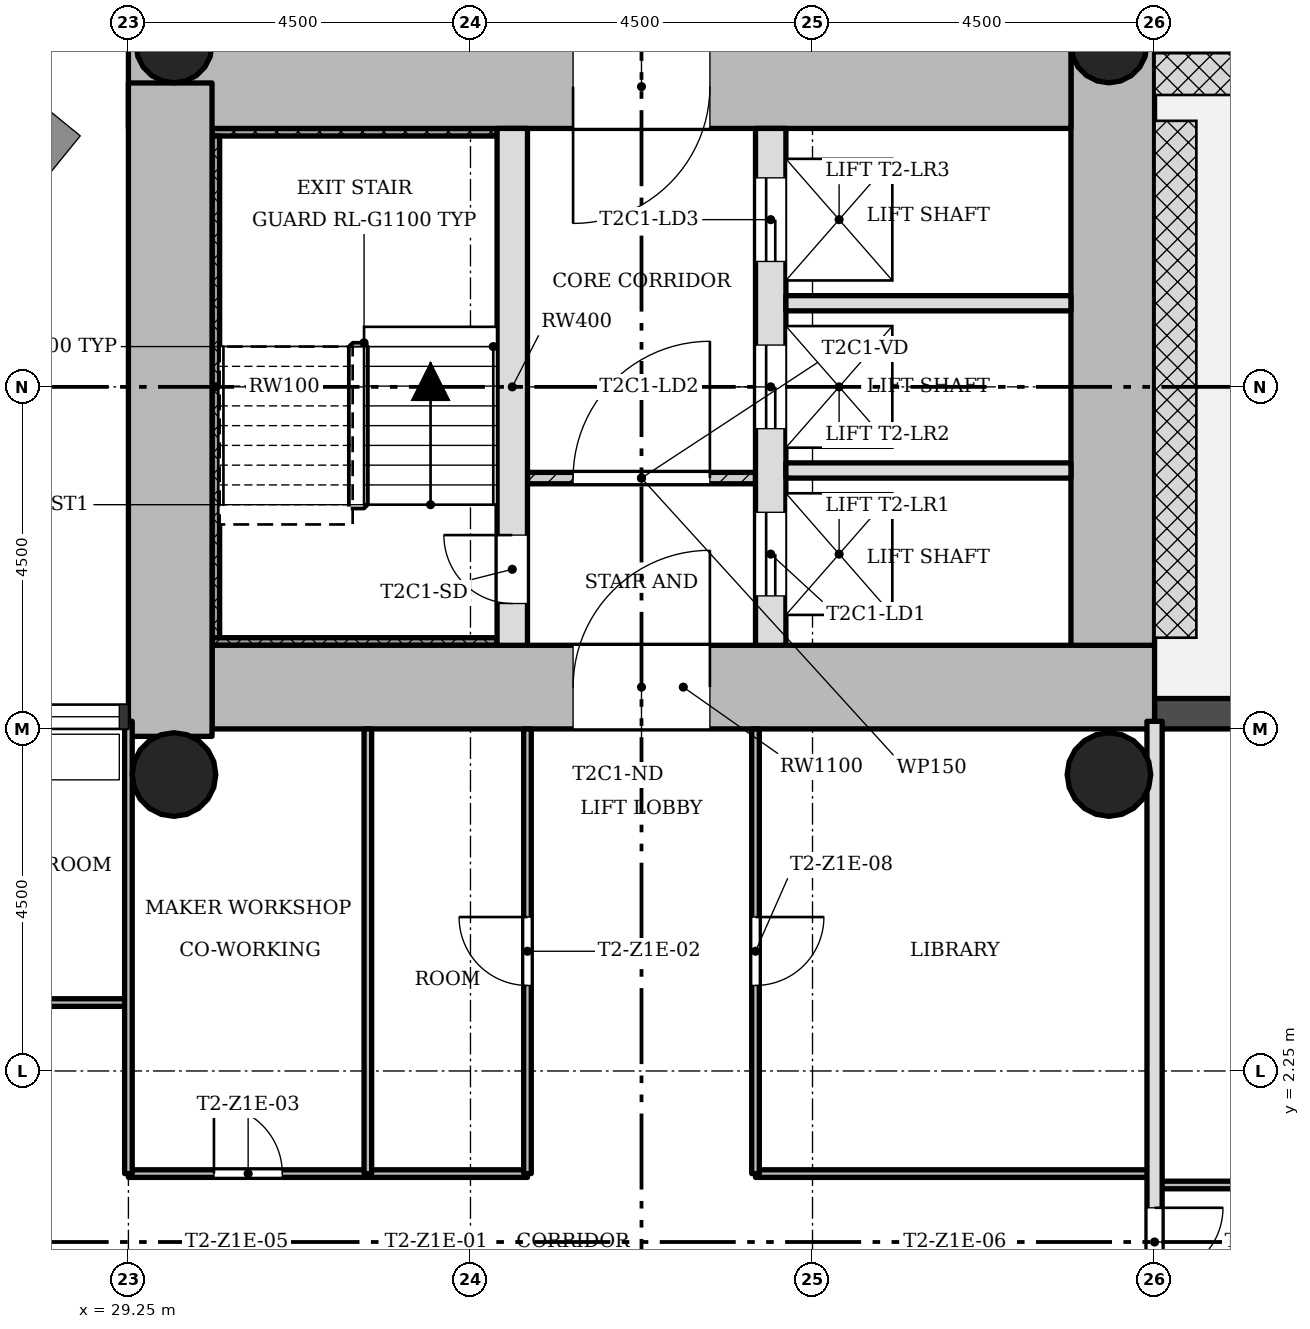
"""IFC4 building model, lengths in metres.
Left out: names, types, materials, properties, quantities, classifications, styles, units other than length and angle.
Written with IfcOpenShell. Run it as: python <this file> out.ifc"""

import sys

from ifc_helpers import new_model, si_unit, direction, frame, frame_2d, origin, origin_2d, place, context, subcontext, project, spatial, rectangle, hollow_circle, extrude, element, fill, save


model = new_model("IFC4")
c1 = context("Model", 3, precision=1e-05, world=origin(), true_north=direction((0.0, 1.0)))
c2 = subcontext(c1, "Body", "Model", "MODEL_VIEW")
j1 = project(units=[si_unit("LENGTHUNIT", "METRE"), si_unit("PLANEANGLEUNIT", "RADIAN")], contexts=[c1])
p1 = place(None, origin())
s1 = spatial("IfcSite", under=j1, at=p1, CompositionType="ELEMENT")
p2 = place(p1, origin())
s2 = spatial("IfcBuilding", under=s1, at=p2, CompositionType="ELEMENT")
p3 = place(p2, frame((0.0, 0.0, 65.3)))
s3 = spatial("IfcBuildingStorey", under=s2, at=p3, CompositionType="ELEMENT", Elevation=65.3)
p4 = place(p3, frame((30.35, 7.3, 0.0), z_axis=(0.0, 0.0, 1.0), x_axis=(1.0, 0.0, 0.0)))
e1 = element("IfcWall", 1, at=p4, inside=s3, PredefinedType="SHEAR", context=c2, shape_type="SweptSolid", body=[
    extrude(rectangle(XDim=12.4, YDim=1.1, at=frame_2d((6.2, 0.0))), origin(), (0.0, 0.0, 1.0), 3.4),
])
p5 = place(p4, frame((4.75, 0.0, 0.0)))
e2 = element("IfcOpeningElement", 2, at=p5, cuts=e1, PredefinedType="OPENING", context=c2, shape_type="SweptSolid", body=[
    extrude(rectangle(XDim=1.8, YDim=2.1, at=frame_2d((0.9, 1.05))), frame((0.0, 0.56, 0.0), z_axis=(0.0, -1.0, 0.0), x_axis=(1.0, 0.0, 0.0)), (0.0, 0.0, 1.0), 1.12),
])
p6 = place(p3, frame((42.2, 7.85, 0.0), z_axis=(0.0, 0.0, 1.0), x_axis=(0.0, 1.0, 0.0)))
e3 = element("IfcWall", 3, at=p6, inside=s3, PredefinedType="SHEAR", context=c2, shape_type="SweptSolid", body=[
    extrude(rectangle(XDim=7.9, YDim=1.1, at=frame_2d((3.95, 0.0))), origin(), (0.0, 0.0, 1.0), 3.4),
])
p7 = place(p3, frame((41.65, 15.2, 0.0), z_axis=(0.0, 0.0, 1.0), x_axis=(-1.0, 0.0, 0.0)))
e4 = element("IfcWall", 4, at=p7, inside=s3, PredefinedType="SHEAR", context=c2, shape_type="SweptSolid", body=[
    extrude(rectangle(XDim=12.4, YDim=1.1, at=frame_2d((6.2, 0.0))), origin(), (0.0, 0.0, 1.0), 3.4),
])
p8 = place(p7, frame((4.75, 0.0, 0.0)))
e5 = element("IfcOpeningElement", 5, at=p8, cuts=e4, PredefinedType="OPENING", context=c2, shape_type="SweptSolid", body=[
    extrude(rectangle(XDim=1.8, YDim=2.1, at=frame_2d((0.9, 1.05))), frame((0.0, 0.56, 0.0), z_axis=(0.0, -1.0, 0.0), x_axis=(1.0, 0.0, 0.0)), (0.0, 0.0, 1.0), 1.12),
])
p9 = place(p3, frame((29.8, 15.248, 0.0), z_axis=(0.0, 0.0, 1.0), x_axis=(0.0, -1.0, 0.0)))
e6 = element("IfcWall", 6, at=p9, inside=s3, PredefinedType="SHEAR", context=c2, shape_type="SweptSolid", body=[
    extrude(rectangle(XDim=8.596, YDim=1.1, at=frame_2d((4.298, 0.0))), origin(), (0.0, 0.0, 1.0), 3.4),
])
p10 = place(p3, frame((34.3, 7.85, 0.0), z_axis=(0.0, 0.0, 1.0), x_axis=(0.0, 1.0, 0.0)))
e7 = element("IfcWall", 7, at=p10, inside=s3, PredefinedType="SHEAR", context=c2, shape_type="SweptSolid", body=[
    extrude(rectangle(XDim=6.8, YDim=0.4, at=frame_2d((3.4, 0.0))), origin(), (0.0, 0.0, 1.0), 3.4),
])
p11 = place(p10, frame((0.55, 0.0, 0.0)))
e8 = element("IfcOpeningElement", 8, at=p11, cuts=e7, PredefinedType="OPENING", context=c2, shape_type="SweptSolid", body=[
    extrude(rectangle(XDim=0.9, YDim=2.1, at=frame_2d((0.45, 1.05))), frame((0.0, 0.21, 0.0), z_axis=(0.0, -1.0, 0.0), x_axis=(1.0, 0.0, 0.0)), (0.0, 0.0, 1.0), 0.42),
])
p12 = place(p3, frame((37.7, 7.85, 0.0), z_axis=(0.0, 0.0, 1.0), x_axis=(0.0, 1.0, 0.0)))
e9 = element("IfcWall", 9, at=p12, inside=s3, PredefinedType="SHEAR", context=c2, shape_type="SweptSolid", body=[
    extrude(rectangle(XDim=6.8, YDim=0.4, at=frame_2d((3.4, 0.0))), origin(), (0.0, 0.0, 1.0), 3.4),
])
p13 = place(p12, frame((0.65, 0.0, 0.0)))
e10 = element("IfcOpeningElement", 10, at=p13, cuts=e9, PredefinedType="OPENING", context=c2, shape_type="SweptSolid", body=[
    extrude(rectangle(XDim=1.1, YDim=2.1, at=frame_2d((0.55, 1.05))), frame((0.0, 0.21, 0.0), z_axis=(0.0, -1.0, 0.0), x_axis=(1.0, 0.0, 0.0)), (0.0, 0.0, 1.0), 0.42),
])
p14 = place(p12, frame((2.85, 0.0, 0.0)))
e11 = element("IfcOpeningElement", 11, at=p14, cuts=e9, PredefinedType="OPENING", context=c2, shape_type="SweptSolid", body=[
    extrude(rectangle(XDim=1.1, YDim=2.1, at=frame_2d((0.55, 1.05))), frame((0.0, 0.21, 0.0), z_axis=(0.0, -1.0, 0.0), x_axis=(1.0, 0.0, 0.0)), (0.0, 0.0, 1.0), 0.42),
])
p15 = place(p12, frame((5.05, 0.0, 0.0)))
e12 = element("IfcOpeningElement", 12, at=p15, cuts=e9, PredefinedType="OPENING", context=c2, shape_type="SweptSolid", body=[
    extrude(rectangle(XDim=1.1, YDim=2.1, at=frame_2d((0.55, 1.05))), frame((0.0, 0.21, 0.0), z_axis=(0.0, -1.0, 0.0), x_axis=(1.0, 0.0, 0.0)), (0.0, 0.0, 1.0), 0.42),
])
for number, where, z_axis, x_axis in (
    (13, (42.15, 15.75, 0.0), (0.0, 0.0, 1.0), (1.0, 0.0, 0.0)),
    (14, (29.85, 15.75, 0.0), (0.0, 0.0, 1.0), (1.0, 0.0, 0.0)),
):
    element("IfcColumn", number, at=place(p3, frame(where, z_axis=z_axis, x_axis=x_axis)), inside=s3, PredefinedType="COLUMN", context=c2, shape_type="SweptSolid", body=[
        extrude(hollow_circle(Radius=0.5, WallThickness=0.036, at=origin_2d()), origin(), (0.0, 0.0, 1.0), 3.4),
    ])
for number, where, z_axis, x_axis in (
    (15, (42.15, 6.15, 0.0), (0.0, 0.0, 1.0), (1.0, 0.0, 0.0)),
    (16, (29.85, 6.15, 0.0), (0.0, 0.0, 1.0), (1.0, 0.0, 0.0)),
):
    element("IfcColumn", number, at=place(p3, frame(where, z_axis=z_axis, x_axis=x_axis)), inside=s3, PredefinedType="COLUMN", context=c2, shape_type="SweptSolid", body=[
        extrude(hollow_circle(Radius=0.55, WallThickness=0.04, at=origin_2d()), origin(), (0.0, 0.0, 1.0), 3.4),
    ])
p16 = place(p3, frame((47.25, 6.95, -0.02), z_axis=(0.0, 0.0, 1.0), x_axis=(-1.0, 0.0, 0.0)))
e17 = element("IfcWall", 17, at=p16, inside=s3, PredefinedType="STANDARD", context=c2, shape_type="SweptSolid", body=[
    extrude(rectangle(XDim=4.5, YDim=0.4, at=frame_2d((2.25, 0.0))), origin(), (0.0, 0.0, 1.0), 3.12),
])
p17 = place(p16, frame((1.35, 0.0, 0.02)))
e18 = element("IfcOpeningElement", 18, at=p17, cuts=e17, PredefinedType="OPENING", context=c2, shape_type="SweptSolid", body=[
    extrude(rectangle(XDim=1.8, YDim=2.1, at=frame_2d((0.9, 1.05))), frame((0.0, 0.21, 0.0), z_axis=(0.0, -1.0, 0.0), x_axis=(1.0, 0.0, 0.0)), (0.0, 0.0, 1.0), 0.42),
])
p18 = place(p3, frame((37.5, 10.05, 0.0), z_axis=(0.0, 0.0, 1.0), x_axis=(-1.0, 0.0, 0.0)))
e19 = element("IfcWall", 19, at=p18, inside=s3, PredefinedType="PARTITIONING", context=c2, shape_type="SweptSolid", body=[
    extrude(rectangle(XDim=3.0, YDim=0.15, at=frame_2d((1.5, 0.0))), origin(), (0.0, 0.0, 1.0), 3.0),
])
p19 = place(p18, frame((0.6, 0.0, 0.0)))
e20 = element("IfcOpeningElement", 20, at=p19, cuts=e19, PredefinedType="OPENING", context=c2, shape_type="SweptSolid", body=[
    extrude(rectangle(XDim=1.8, YDim=2.1, at=frame_2d((0.9, 1.05))), frame((0.0, 0.085, 0.0), z_axis=(0.0, -1.0, 0.0), x_axis=(1.0, 0.0, 0.0)), (0.0, 0.0, 1.0), 0.17),
])
for number, where, z_axis, x_axis in (
    (21, (41.65, 10.15, 0.0), (0.0, 0.0, 1.0), (-1.0, 0.0, 0.0)),
    (22, (41.65, 12.35, 0.0), (0.0, 0.0, 1.0), (-1.0, 0.0, 0.0)),
):
    element("IfcWall", number, at=place(p3, frame(where, z_axis=z_axis, x_axis=x_axis)), inside=s3, PredefinedType="SOLIDWALL", context=c2, shape_type="SweptSolid", body=[
        extrude(rectangle(XDim=3.75, YDim=0.2, at=frame_2d((1.875, 0.0))), origin(), (0.0, 0.0, 1.0), 3.0),
    ])
p20 = place(p3, frame((47.25, 0.75, 0.0), z_axis=(0.0, 0.0, 1.0), x_axis=(-1.0, 0.0, 0.0)))
e23 = element("IfcWall", 23, at=p20, inside=s3, PredefinedType="PARTITIONING", context=c2, shape_type="SweptSolid", body=[
    extrude(rectangle(XDim=4.5, YDim=0.1, at=frame_2d((2.25, 0.0))), origin(), (0.0, 0.0, 1.0), 3.0),
])
p21 = place(p20, frame((1.8, 0.0, 0.0)))
e24 = element("IfcOpeningElement", 24, at=p21, cuts=e23, PredefinedType="OPENING", context=c2, shape_type="SweptSolid", body=[
    extrude(rectangle(XDim=0.9, YDim=2.1, at=frame_2d((0.45, 1.05))), frame((0.0, 0.06, 0.0), z_axis=(0.0, -1.0, 0.0), x_axis=(1.0, 0.0, 0.0)), (0.0, 0.0, 1.0), 0.12),
])
p22 = place(p3, frame((42.75, 0.9, 0.0), z_axis=(0.0, 0.0, 1.0), x_axis=(-1.0, 0.0, 0.0)))
e25 = element("IfcWall", 25, at=p22, inside=s3, PredefinedType="PARTITIONING", context=c2, shape_type="SweptSolid", body=[
    extrude(rectangle(XDim=5.25, YDim=0.1, at=frame_2d((2.625, 0.0))), origin(), (0.0, 0.0, 1.0), 3.0),
])
p23 = place(p3, frame((34.5, 0.9, 0.0), z_axis=(0.0, 0.0, 1.0), x_axis=(-1.0, 0.0, 0.0)))
e26 = element("IfcWall", 26, at=p23, inside=s3, PredefinedType="PARTITIONING", context=c2, shape_type="SweptSolid", body=[
    extrude(rectangle(XDim=5.25, YDim=0.1, at=frame_2d((2.625, 0.0))), origin(), (0.0, 0.0, 1.0), 3.0),
])
p24 = place(p23, frame((3.225, 0.0, 0.0)))
e27 = element("IfcOpeningElement", 27, at=p24, cuts=e26, PredefinedType="OPENING", context=c2, shape_type="SweptSolid", body=[
    extrude(rectangle(XDim=0.9, YDim=2.1, at=frame_2d((0.45, 1.05))), frame((0.0, 0.06, 0.0), z_axis=(0.0, -1.0, 0.0), x_axis=(1.0, 0.0, 0.0)), (0.0, 0.0, 1.0), 0.12),
])
p25 = place(p3, frame((29.25, 3.15, 0.0), z_axis=(0.0, 0.0, 1.0), x_axis=(-1.0, 0.0, 0.0)))
e28 = element("IfcWall", 28, at=p25, inside=s3, PredefinedType="PARTITIONING", context=c2, shape_type="SweptSolid", body=[
    extrude(rectangle(XDim=9.0, YDim=0.1, at=frame_2d((4.5, 0.0))), origin(), (0.0, 0.0, 1.0), 3.0),
])
p26 = place(p25, frame((1.8, 0.0, 0.0)))
e29 = element("IfcOpeningElement", 29, at=p26, cuts=e28, PredefinedType="OPENING", context=c2, shape_type="SweptSolid", body=[
    extrude(rectangle(XDim=0.9, YDim=2.1, at=frame_2d((0.45, 1.05))), frame((0.0, 0.06, 0.0), z_axis=(0.0, -1.0, 0.0), x_axis=(1.0, 0.0, 0.0)), (0.0, 0.0, 1.0), 0.12),
])
p27 = place(p25, frame((6.3, 0.0, 0.0)))
e30 = element("IfcOpeningElement", 30, at=p27, cuts=e28, PredefinedType="OPENING", context=c2, shape_type="SweptSolid", body=[
    extrude(rectangle(XDim=0.9, YDim=2.1, at=frame_2d((0.45, 1.05))), frame((0.0, 0.06, 0.0), z_axis=(0.0, -1.0, 0.0), x_axis=(1.0, 0.0, 0.0)), (0.0, 0.0, 1.0), 0.12),
])
p28 = place(p3, frame((42.75, -6.85, 0.0), z_axis=(0.0, 0.0, 1.0), x_axis=(0.0, 1.0, 0.0)))
e31 = element("IfcWall", 31, at=p28, inside=s3, PredefinedType="SOLIDWALL", context=c2, shape_type="SweptSolid", body=[
    extrude(rectangle(XDim=13.7, YDim=0.2, at=frame_2d((6.85, 0.0))), origin(), (0.0, 0.0, 1.0), 3.0),
])
p29 = place(p28, frame((6.4, 0.0, 0.0)))
e32 = element("IfcOpeningElement", 32, at=p29, cuts=e31, PredefinedType="OPENING", context=c2, shape_type="SweptSolid", body=[
    extrude(rectangle(XDim=0.9, YDim=2.1, at=frame_2d((0.45, 1.05))), frame((0.0, 0.11, 0.0), z_axis=(0.0, -1.0, 0.0), x_axis=(1.0, 0.0, 0.0)), (0.0, 0.0, 1.0), 0.22),
])
p30 = place(p3, frame((37.5, 0.9, 0.0), z_axis=(0.0, 0.0, 1.0), x_axis=(0.0, 1.0, 0.0)))
e33 = element("IfcWall", 33, at=p30, inside=s3, PredefinedType="PARTITIONING", context=c2, shape_type="SweptSolid", body=[
    extrude(rectangle(XDim=5.85, YDim=0.1, at=frame_2d((2.925, 0.0))), origin(), (0.0, 0.0, 1.0), 3.0),
])
p31 = place(p30, frame((2.475, 0.0, 0.0)))
e34 = element("IfcOpeningElement", 34, at=p31, cuts=e33, PredefinedType="OPENING", context=c2, shape_type="SweptSolid", body=[
    extrude(rectangle(XDim=0.9, YDim=2.1, at=frame_2d((0.45, 1.05))), frame((0.0, 0.06, 0.0), z_axis=(0.0, -1.0, 0.0), x_axis=(1.0, 0.0, 0.0)), (0.0, 0.0, 1.0), 0.12),
])
p32 = place(p3, frame((34.5, 0.9, 0.0), z_axis=(0.0, 0.0, 1.0), x_axis=(0.0, 1.0, 0.0)))
e35 = element("IfcWall", 35, at=p32, inside=s3, PredefinedType="PARTITIONING", context=c2, shape_type="SweptSolid", body=[
    extrude(rectangle(XDim=5.85, YDim=0.1, at=frame_2d((2.925, 0.0))), origin(), (0.0, 0.0, 1.0), 3.0),
])
p33 = place(p32, frame((2.475, 0.0, 0.0)))
e36 = element("IfcOpeningElement", 36, at=p33, cuts=e35, PredefinedType="OPENING", context=c2, shape_type="SweptSolid", body=[
    extrude(rectangle(XDim=0.9, YDim=2.1, at=frame_2d((0.45, 1.05))), frame((0.0, 0.06, 0.0), z_axis=(0.0, -1.0, 0.0), x_axis=(1.0, 0.0, 0.0)), (0.0, 0.0, 1.0), 0.12),
])
p34 = place(p3, frame((32.4, 0.9, 0.0), z_axis=(0.0, 0.0, 1.0), x_axis=(0.0, 1.0, 0.0)))
e37 = element("IfcWall", 37, at=p34, inside=s3, PredefinedType="PARTITIONING", context=c2, shape_type="SweptSolid", body=[
    extrude(rectangle(XDim=5.85, YDim=0.1, at=frame_2d((2.925, 0.0))), origin(), (0.0, 0.0, 1.0), 3.0),
])
p35 = place(p3, frame((29.25, 0.9, 0.0), z_axis=(0.0, 0.0, 1.0), x_axis=(0.0, 1.0, 0.0)))
e38 = element("IfcWall", 38, at=p35, inside=s3, PredefinedType="PARTITIONING", context=c2, shape_type="SweptSolid", body=[
    extrude(rectangle(XDim=5.95, YDim=0.1, at=frame_2d((2.975, 0.0))), origin(), (0.0, 0.0, 1.0), 3.0),
])
p36 = place(p3, frame((34.1, 14.6, 0.0), z_axis=(0.0, 0.0, 1.0), x_axis=(-1.0, 0.0, 0.0)))
e39 = element("IfcWall", 39, at=p36, inside=s3, PredefinedType="SHEAR", context=c2, shape_type="SweptSolid", body=[
    extrude(rectangle(XDim=3.75, YDim=0.1, at=frame_2d((1.875, 0.0))), origin(), (0.0, 0.0, 1.0), 3.4),
])
p37 = place(p3, frame((30.4, 7.95, 0.0), z_axis=(0.0, 0.0, 1.0), x_axis=(0.0, 1.0, 0.0)))
e40 = element("IfcWall", 40, at=p37, inside=s3, PredefinedType="SHEAR", context=c2, shape_type="SweptSolid", body=[
    extrude(rectangle(XDim=6.6, YDim=0.1, at=frame_2d((3.3, 0.0))), origin(), (0.0, 0.0, 1.0), 3.4),
])
p38 = place(p3, frame((34.1, 7.9, 0.0), z_axis=(0.0, 0.0, 1.0), x_axis=(-1.0, 0.0, 0.0)))
e41 = element("IfcWall", 41, at=p38, inside=s3, PredefinedType="SHEAR", context=c2, shape_type="SweptSolid", body=[
    extrude(rectangle(XDim=3.75, YDim=0.1, at=frame_2d((1.875, 0.0))), origin(), (0.0, 0.0, 1.0), 3.4),
])
p39 = place(p19, origin())
e42 = element("IfcDoor", 42, at=p39, inside=s3, OperationType="SINGLE_SWING_LEFT", PredefinedType="DOOR", context=c2, shape_type="SweptSolid", body=[
    extrude(rectangle(XDim=1.8, YDim=2.1, at=frame_2d((0.9, 1.05))), frame((0.0, 0.025, 0.0), z_axis=(0.0, -1.0, 0.0), x_axis=(1.0, 0.0, 0.0)), (0.0, 0.0, 1.0), 0.05),
])
fill(e20, e42)
p40 = place(p33, origin())
e43 = element("IfcDoor", 43, at=p40, inside=s3, OperationType="SINGLE_SWING_LEFT", PredefinedType="DOOR", context=c2, shape_type="SweptSolid", body=[
    extrude(rectangle(XDim=0.9, YDim=2.1, at=frame_2d((0.45, 1.05))), frame((0.0, 0.025, 0.0), z_axis=(0.0, -1.0, 0.0), x_axis=(1.0, 0.0, 0.0)), (0.0, 0.0, 1.0), 0.05),
])
fill(e36, e43)
p41 = place(p24, origin())
e44 = element("IfcDoor", 44, at=p41, inside=s3, OperationType="SINGLE_SWING_RIGHT", PredefinedType="DOOR", context=c2, shape_type="SweptSolid", body=[
    extrude(rectangle(XDim=0.9, YDim=2.1, at=frame_2d((0.45, 1.05))), frame((0.0, 0.025, 0.0), z_axis=(0.0, -1.0, 0.0), x_axis=(1.0, 0.0, 0.0)), (0.0, 0.0, 1.0), 0.05),
])
fill(e27, e44)
p42 = place(p31, origin())
e45 = element("IfcDoor", 45, at=p42, inside=s3, OperationType="SINGLE_SWING_RIGHT", PredefinedType="DOOR", context=c2, shape_type="SweptSolid", body=[
    extrude(rectangle(XDim=0.9, YDim=2.1, at=frame_2d((0.45, 1.05))), frame((0.0, 0.025, 0.0), z_axis=(0.0, -1.0, 0.0), x_axis=(1.0, 0.0, 0.0)), (0.0, 0.0, 1.0), 0.05),
])
fill(e34, e45)
p43 = place(p29, origin())
e46 = element("IfcDoor", 46, at=p43, inside=s3, OperationType="SINGLE_SWING_RIGHT", PredefinedType="DOOR", context=c2, shape_type="SweptSolid", body=[
    extrude(rectangle(XDim=0.9, YDim=2.1, at=frame_2d((0.45, 1.05))), frame((0.0, 0.025, 0.0), z_axis=(0.0, -1.0, 0.0), x_axis=(1.0, 0.0, 0.0)), (0.0, 0.0, 1.0), 0.05),
])
fill(e32, e46)
p44 = place(p11, origin())
e47 = element("IfcDoor", 47, at=p44, inside=s3, OperationType="SINGLE_SWING_LEFT", PredefinedType="DOOR", context=c2, shape_type="SweptSolid", body=[
    extrude(rectangle(XDim=0.9, YDim=2.1, at=frame_2d((0.45, 1.05))), frame((0.0, 0.025, 0.0), z_axis=(0.0, -1.0, 0.0), x_axis=(1.0, 0.0, 0.0)), (0.0, 0.0, 1.0), 0.05),
])
fill(e8, e47)
p45 = place(p13, origin())
e48 = element("IfcDoor", 48, at=p45, inside=s3, OperationType="SLIDING_TO_LEFT", PredefinedType="DOOR", context=c2, shape_type="SweptSolid", body=[
    extrude(rectangle(XDim=1.1, YDim=2.1, at=frame_2d((0.55, 1.05))), frame((0.0, 0.025, 0.0), z_axis=(0.0, -1.0, 0.0), x_axis=(1.0, 0.0, 0.0)), (0.0, 0.0, 1.0), 0.05),
])
fill(e10, e48)
p46 = place(p14, origin())
e49 = element("IfcDoor", 49, at=p46, inside=s3, OperationType="SLIDING_TO_LEFT", PredefinedType="DOOR", context=c2, shape_type="SweptSolid", body=[
    extrude(rectangle(XDim=1.1, YDim=2.1, at=frame_2d((0.55, 1.05))), frame((0.0, 0.025, 0.0), z_axis=(0.0, -1.0, 0.0), x_axis=(1.0, 0.0, 0.0)), (0.0, 0.0, 1.0), 0.05),
])
fill(e11, e49)
p47 = place(p15, origin())
e50 = element("IfcDoor", 50, at=p47, inside=s3, OperationType="SLIDING_TO_LEFT", PredefinedType="DOOR", context=c2, shape_type="SweptSolid", body=[
    extrude(rectangle(XDim=1.1, YDim=2.1, at=frame_2d((0.55, 1.05))), frame((0.0, 0.025, 0.0), z_axis=(0.0, -1.0, 0.0), x_axis=(1.0, 0.0, 0.0)), (0.0, 0.0, 1.0), 0.05),
])
fill(e12, e50)
p48 = place(p5, origin())
e51 = element("IfcDoor", 51, at=p48, inside=s3, OperationType="SINGLE_SWING_LEFT", PredefinedType="DOOR", context=c2, shape_type="SweptSolid", body=[
    extrude(rectangle(XDim=1.8, YDim=2.1, at=frame_2d((0.9, 1.05))), frame((0.0, 0.025, 0.0), z_axis=(0.0, -1.0, 0.0), x_axis=(1.0, 0.0, 0.0)), (0.0, 0.0, 1.0), 0.05),
])
fill(e2, e51)
p49 = place(p8, origin())
e52 = element("IfcDoor", 52, at=p49, inside=s3, OperationType="SINGLE_SWING_LEFT", PredefinedType="DOOR", context=c2, shape_type="SweptSolid", body=[
    extrude(rectangle(XDim=1.8, YDim=2.1, at=frame_2d((0.9, 1.05))), frame((0.0, 0.025, 0.0), z_axis=(0.0, -1.0, 0.0), x_axis=(1.0, 0.0, 0.0)), (0.0, 0.0, 1.0), 0.05),
])
fill(e5, e52)
save(model, sys.argv[1])
